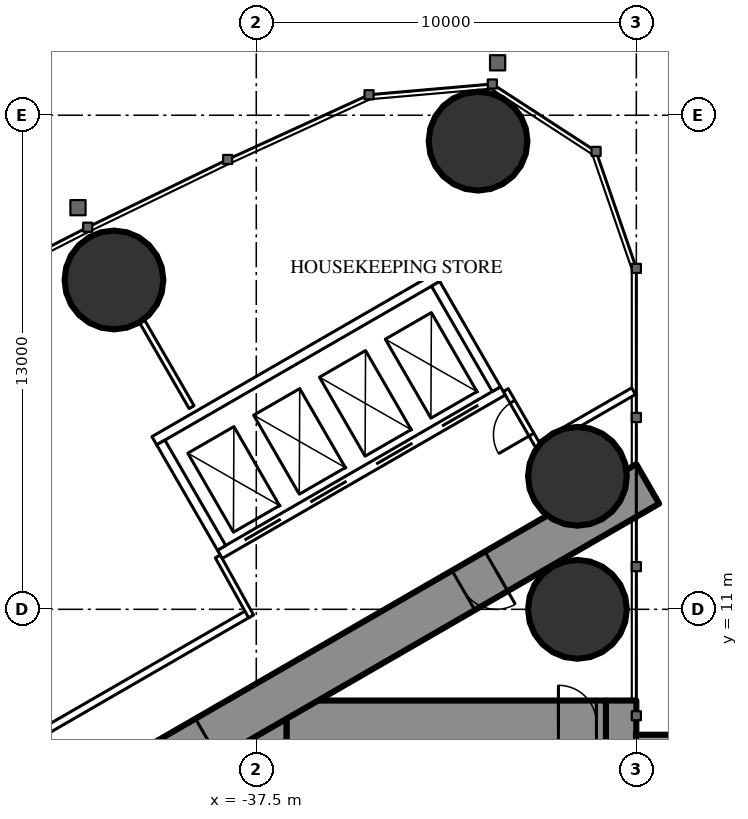
"""IFC4 building model, lengths in metres.
Left out: names, types, materials, properties, quantities, classifications, styles, units other than length and angle.
Written with IfcOpenShell. Run it as: python <this file> out.ifc"""

import sys

from ifc_helpers import new_model, si_unit, direction, frame, frame_2d, origin, origin_2d, place, context, subcontext, project, spatial, rectangle, hollow_circle, extrude, element, fill, save


model = new_model("IFC4")
c1 = context("Model", 3, precision=1e-05, world=origin(), true_north=direction((0.0, 1.0)))
c2 = subcontext(c1, "Body", "Model", "MODEL_VIEW")
j1 = project(units=[si_unit("LENGTHUNIT", "METRE"), si_unit("PLANEANGLEUNIT", "RADIAN")], contexts=[c1])
p1 = place(None, origin())
s1 = spatial("IfcSite", under=j1, at=p1, CompositionType="ELEMENT")
p2 = place(p1, origin())
s2 = spatial("IfcBuilding", under=s1, at=p2, CompositionType="ELEMENT")
p3 = place(p2, frame((0.0, 0.0, 115.1)))
s3 = spatial("IfcBuildingStorey", under=s2, at=p3, CompositionType="ELEMENT", Elevation=115.1)
for number, where, z_axis, x_axis in (
    (1, (-31.665, 23.318, 0.0), (0.0, 0.0, 1.0), (1.0, 0.0, 0.0)),
    (2, (-29.05, 11.0, 0.0), (0.0, 0.0, 1.0), (1.0, 0.0, 0.0)),
    (3, (-29.05, 14.5, 0.0), (0.0, 0.0, 1.0), (1.0, 0.0, 0.0)),
    (4, (-41.245, 19.666, 0.0), (0.0, 0.0, 1.0), (1.0, 0.0, 0.0)),
):
    element("IfcColumn", number, at=place(p3, frame(where, z_axis=z_axis, x_axis=x_axis)), inside=s3, PredefinedType="COLUMN", context=c2, shape_type="SweptSolid", body=[
        extrude(hollow_circle(Radius=1.3, WallThickness=0.1, at=origin_2d()), origin(), (0.0, 0.0, 1.0), 3.5),
    ])
p4 = place(p3, frame((-27.9, 8.6, 0.0), z_axis=(0.0, 0.0, 1.0), x_axis=(0.0, -1.0, 0.0)))
e5 = element("IfcWall", 5, at=p4, inside=s3, PredefinedType="SHEAR", context=c2, shape_type="SweptSolid", body=[
    extrude(rectangle(XDim=17.2, YDim=0.8, at=frame_2d((8.6, 0.0))), origin(), (0.0, 0.0, 1.0), 3.5),
])
p5 = place(p4, frame((2.45, 0.0, 0.6)))
e6 = element("IfcOpeningElement", 6, at=p5, cuts=e5, PredefinedType="OPENING", context=c2, shape_type="SweptSolid", body=[
    extrude(rectangle(XDim=0.6, YDim=2.1, at=frame_2d((0.3, 1.05))), frame((0.0, 0.41, 0.0), z_axis=(0.0, -1.0, 0.0), x_axis=(1.0, 0.0, 0.0)), (0.0, 0.0, 1.0), 0.82),
])
p6 = place(p4, frame((14.15, 0.0, 0.6)))
e7 = element("IfcOpeningElement", 7, at=p6, cuts=e5, PredefinedType="OPENING", context=c2, shape_type="SweptSolid", body=[
    extrude(rectangle(XDim=0.6, YDim=2.1, at=frame_2d((0.3, 1.05))), frame((0.0, 0.41, 0.0), z_axis=(0.0, -1.0, 0.0), x_axis=(1.0, 0.0, 0.0)), (0.0, 0.0, 1.0), 0.82),
])
p7 = place(p3, frame((-37.3, 8.6, 0.0), z_axis=(0.0, 0.0, 1.0), x_axis=(0.0, -1.0, 0.0)))
e8 = element("IfcWall", 8, at=p7, inside=s3, PredefinedType="SHEAR", context=c2, shape_type="SweptSolid", body=[
    extrude(rectangle(XDim=17.2, YDim=1.2, at=frame_2d((8.6, 0.0))), origin(), (0.0, 0.0, 1.0), 3.5),
])
p8 = place(p7, frame((7.7, 0.0, 0.0)))
e9 = element("IfcOpeningElement", 9, at=p8, cuts=e8, PredefinedType="OPENING", context=c2, shape_type="SweptSolid", body=[
    extrude(rectangle(XDim=1.8, YDim=2.2, at=frame_2d((0.9, 1.1))), frame((0.0, 0.61, 0.0), z_axis=(0.0, -1.0, 0.0), x_axis=(1.0, 0.0, 0.0)), (0.0, 0.0, 1.0), 1.22),
])
p9 = place(p3, frame((-28.3, 8.0, 0.0), z_axis=(0.0, 0.0, 1.0), x_axis=(-1.0, 0.0, 0.0)))
e10 = element("IfcWall", 10, at=p9, inside=s3, PredefinedType="SHEAR", context=c2, shape_type="SweptSolid", body=[
    extrude(rectangle(XDim=8.4, YDim=1.2, at=frame_2d((4.2, 0.0))), origin(), (0.0, 0.0, 1.0), 3.5),
])
p10 = place(p9, frame((0.25, 0.0, 0.0)))
e11 = element("IfcOpeningElement", 11, at=p10, cuts=e10, PredefinedType="OPENING", context=c2, shape_type="SweptSolid", body=[
    extrude(rectangle(XDim=1.0, YDim=2.2, at=frame_2d((0.5, 1.1))), frame((0.0, 0.61, 0.0), z_axis=(0.0, -1.0, 0.0), x_axis=(1.0, 0.0, 0.0)), (0.0, 0.0, 1.0), 1.22),
])
p11 = place(p3, frame((-27.2, 14.3, 0.0), z_axis=(0.0, 0.0, 1.0), x_axis=(-0.866026593062, -0.499997940104, 0.0)))
e12 = element("IfcWall", 12, at=p11, inside=s3, PredefinedType="SHEAR", context=c2, shape_type="SweptSolid", body=[
    extrude(rectangle(XDim=28.946, YDim=1.2, at=frame_2d((14.473, 0.0))), origin(), (0.0, 0.0, 1.0), 3.5),
])
p12 = place(p11, frame((4.6, 0.0, 0.0)))
e13 = element("IfcOpeningElement", 13, at=p12, cuts=e12, PredefinedType="OPENING", context=c2, shape_type="SweptSolid", body=[
    extrude(rectangle(XDim=1.0, YDim=2.2, at=frame_2d((0.5, 1.1))), frame((0.0, 0.61, 0.0), z_axis=(0.0, -1.0, 0.0), x_axis=(1.0, 0.0, 0.0)), (0.0, 0.0, 1.0), 1.22),
])
p13 = place(p11, frame((13.395, 0.0, 0.0)))
e14 = element("IfcOpeningElement", 14, at=p13, cuts=e12, PredefinedType="OPENING", context=c2, shape_type="SweptSolid", body=[
    extrude(rectangle(XDim=1.8, YDim=2.2, at=frame_2d((0.9, 1.1))), frame((0.0, 0.61, 0.0), z_axis=(0.0, -1.0, 0.0), x_axis=(1.0, 0.0, 0.0)), (0.0, 0.0, 1.0), 1.22),
])
p14 = place(p3, frame((-39.202, 16.32, 0.0), z_axis=(0.0, 0.0, 1.0), x_axis=(-0.499947391036, 0.866055775454, 0.0)))
e15 = element("IfcWall", 15, at=p14, inside=s3, PredefinedType="PARTITIONING", context=c2, shape_type="SweptSolid", body=[
    extrude(rectangle(XDim=2.599, YDim=0.15, at=frame_2d((1.3, 0.0))), origin(), (0.0, 0.0, 1.0), 3.25),
])
p15 = place(p3, frame((-27.572, 16.741, 0.0), z_axis=(0.0, 0.0, 1.0), x_axis=(-0.866034618596, -0.499984039138, 0.0)))
e16 = element("IfcWall", 16, at=p15, inside=s3, PredefinedType="PARTITIONING", context=c2, shape_type="SweptSolid", body=[
    extrude(rectangle(XDim=2.854, YDim=0.2, at=frame_2d((1.427, 0.0))), origin(), (0.0, 0.0, 1.0), 3.25),
])
p16 = place(p3, frame((-37.7, 10.894, 0.0), z_axis=(0.0, 0.0, 1.0), x_axis=(-0.866027905338, -0.499995667157, 0.0)))
e17 = element("IfcWall", 17, at=p16, inside=s3, PredefinedType="PARTITIONING", context=c2, shape_type="SweptSolid", body=[
    extrude(rectangle(XDim=21.787, YDim=0.2, at=frame_2d((10.894, 0.0))), origin(), (0.0, 0.0, 1.0), 3.25),
])
p17 = place(p16, frame((11.23, 0.0, 0.0)))
e18 = element("IfcOpeningElement", 18, at=p17, cuts=e17, PredefinedType="OPENING", context=c2, shape_type="SweptSolid", body=[
    extrude(rectangle(XDim=0.95, YDim=2.2, at=frame_2d((0.475, 1.1))), frame((0.0, 0.11, 0.0), z_axis=(0.0, -1.0, 0.0), x_axis=(1.0, 0.0, 0.0)), (0.0, 0.0, 1.0), 0.22),
])
p18 = place(p16, frame((9.531, 0.0, 0.0)))
e19 = element("IfcOpeningElement", 19, at=p18, cuts=e17, PredefinedType="OPENING", context=c2, shape_type="SweptSolid", body=[
    extrude(rectangle(XDim=0.95, YDim=2.2, at=frame_2d((0.475, 1.1))), frame((0.0, 0.11, 0.0), z_axis=(0.0, -1.0, 0.0), x_axis=(1.0, 0.0, 0.0)), (0.0, 0.0, 1.0), 0.22),
])
p19 = place(p3, frame((-38.513, 12.392, 0.0), z_axis=(0.0, 0.0, 1.0), x_axis=(0.485585508183, -0.874189175317, 0.0)))
e20 = element("IfcWall", 20, at=p19, inside=s3, PredefinedType="PARTITIONING", context=c2, shape_type="SweptSolid", body=[
    extrude(rectangle(XDim=1.805, YDim=0.15, at=frame_2d((0.902, 0.0))), origin(), (0.0, 0.0, 1.0), 3.25),
])
p20 = place(p3, frame((-30.033, 15.205, 0.0), z_axis=(0.0, 0.0, 1.0), x_axis=(-0.499980071345, 0.866036909293, 0.0)))
e21 = element("IfcWall", 21, at=p20, inside=s3, PredefinedType="PARTITIONING", context=c2, shape_type="SweptSolid", body=[
    extrude(rectangle(XDim=1.805, YDim=0.15, at=frame_2d((0.902, 0.0))), origin(), (0.0, 0.0, 1.0), 2.2),
])
p21 = place(p20, frame((0.452, 0.0, 0.0)))
e22 = element("IfcOpeningElement", 22, at=p21, cuts=e21, PredefinedType="OPENING", context=c2, shape_type="SweptSolid", body=[
    extrude(rectangle(XDim=1.0, YDim=2.2, at=frame_2d((0.5, 1.1))), frame((0.0, 0.085, 0.0), z_axis=(0.0, -1.0, 0.0), x_axis=(1.0, 0.0, 0.0)), (0.0, 0.0, 1.0), 0.17),
])
p22 = place(p3, frame((-31.01, 16.747, 0.0), z_axis=(0.0, 0.0, 1.0), x_axis=(-0.866028165386, -0.499995216735, 0.0)))
e23 = element("IfcWall", 23, at=p22, inside=s3, PredefinedType="PARTITIONING", context=c2, shape_type="SweptSolid", body=[
    extrude(rectangle(XDim=8.6, YDim=0.25, at=frame_2d((4.3, 0.0))), origin(), (0.0, 0.0, 1.0), 3.25),
])
p23 = place(p22, frame((0.75, 0.0, 0.0)))
e24 = element("IfcOpeningElement", 24, at=p23, cuts=e23, PredefinedType="OPENING", context=c2, shape_type="SweptSolid", body=[
    extrude(rectangle(XDim=1.1, YDim=2.2, at=frame_2d((0.55, 1.1))), frame((0.0, 0.135, 0.0), z_axis=(0.0, -1.0, 0.0), x_axis=(1.0, 0.0, 0.0)), (0.0, 0.0, 1.0), 0.27),
])
p24 = place(p22, frame((2.75, 0.0, 0.0)))
e25 = element("IfcOpeningElement", 25, at=p24, cuts=e23, PredefinedType="OPENING", context=c2, shape_type="SweptSolid", body=[
    extrude(rectangle(XDim=1.1, YDim=2.2, at=frame_2d((0.55, 1.1))), frame((0.0, 0.135, 0.0), z_axis=(0.0, -1.0, 0.0), x_axis=(1.0, 0.0, 0.0)), (0.0, 0.0, 1.0), 0.27),
])
p25 = place(p22, frame((4.75, 0.0, 0.0)))
e26 = element("IfcOpeningElement", 26, at=p25, cuts=e23, PredefinedType="OPENING", context=c2, shape_type="SweptSolid", body=[
    extrude(rectangle(XDim=1.1, YDim=2.2, at=frame_2d((0.55, 1.1))), frame((0.0, 0.135, 0.0), z_axis=(0.0, -1.0, 0.0), x_axis=(1.0, 0.0, 0.0)), (0.0, 0.0, 1.0), 0.27),
])
p26 = place(p22, frame((6.75, 0.0, 0.0)))
e27 = element("IfcOpeningElement", 27, at=p26, cuts=e23, PredefinedType="OPENING", context=c2, shape_type="SweptSolid", body=[
    extrude(rectangle(XDim=1.1, YDim=2.2, at=frame_2d((0.55, 1.1))), frame((0.0, 0.135, 0.0), z_axis=(0.0, -1.0, 0.0), x_axis=(1.0, 0.0, 0.0)), (0.0, 0.0, 1.0), 0.27),
])
p27 = place(p3, frame((-32.736, 19.736, 0.0), z_axis=(0.0, 0.0, 1.0), x_axis=(-0.866028165386, -0.499995216735, 0.0)))
e28 = element("IfcWall", 28, at=p27, inside=s3, PredefinedType="PARTITIONING", context=c2, shape_type="SweptSolid", body=[
    extrude(rectangle(XDim=8.6, YDim=0.25, at=frame_2d((4.3, 0.0))), origin(), (0.0, 0.0, 1.0), 3.25),
])
p28 = place(p3, frame((-31.181, 16.793, 0.0), z_axis=(0.0, 0.0, 1.0), x_axis=(-0.499929347863, 0.866066190972, 0.0)))
e29 = element("IfcWall", 29, at=p28, inside=s3, PredefinedType="PARTITIONING", context=c2, shape_type="SweptSolid", body=[
    extrude(rectangle(XDim=3.201, YDim=0.25, at=frame_2d((1.6, 0.0))), origin(), (0.0, 0.0, 1.0), 3.25),
])
p29 = place(p3, frame((-38.413, 12.618, 0.0), z_axis=(0.0, 0.0, 1.0), x_axis=(-0.499872130319, 0.866099216793, 0.0)))
e30 = element("IfcWall", 30, at=p29, inside=s3, PredefinedType="PARTITIONING", context=c2, shape_type="SweptSolid", body=[
    extrude(rectangle(XDim=3.2, YDim=0.25, at=frame_2d((1.6, 0.0))), origin(), (0.0, 0.0, 1.0), 3.25),
])
p30 = place(p21, origin())
e31 = element("IfcDoor", 31, at=p30, inside=s3, OperationType="SINGLE_SWING_LEFT", PredefinedType="DOOR", context=c2, shape_type="SweptSolid", body=[
    extrude(rectangle(XDim=1.0, YDim=2.2, at=frame_2d((0.5, 1.1))), frame((0.0, 0.025, 0.0), z_axis=(0.0, -1.0, 0.0), x_axis=(1.0, 0.0, 0.0)), (0.0, 0.0, 1.0), 0.05),
])
fill(e22, e31)
p31 = place(p12, origin())
e32 = element("IfcDoor", 32, at=p31, inside=s3, OperationType="SINGLE_SWING_LEFT", PredefinedType="DOOR", context=c2, shape_type="SweptSolid", body=[
    extrude(rectangle(XDim=1.0, YDim=2.2, at=frame_2d((0.5, 1.1))), frame((0.0, 0.025, 0.0), z_axis=(0.0, -1.0, 0.0), x_axis=(1.0, 0.0, 0.0)), (0.0, 0.0, 1.0), 0.05),
])
fill(e13, e32)
p32 = place(p13, origin())
e33 = element("IfcDoor", 33, at=p32, inside=s3, OperationType="DOUBLE_DOOR_SINGLE_SWING", PredefinedType="DOOR", context=c2, shape_type="SweptSolid", body=[
    extrude(rectangle(XDim=1.8, YDim=2.2, at=frame_2d((0.9, 1.1))), frame((0.0, 0.025, 0.0), z_axis=(0.0, -1.0, 0.0), x_axis=(1.0, 0.0, 0.0)), (0.0, 0.0, 1.0), 0.05),
])
fill(e14, e33)
p33 = place(p10, origin())
e34 = element("IfcDoor", 34, at=p33, inside=s3, OperationType="SINGLE_SWING_RIGHT", PredefinedType="DOOR", context=c2, shape_type="SweptSolid", body=[
    extrude(rectangle(XDim=1.0, YDim=2.2, at=frame_2d((0.5, 1.1))), frame((0.0, 0.025, 0.0), z_axis=(0.0, -1.0, 0.0), x_axis=(1.0, 0.0, 0.0)), (0.0, 0.0, 1.0), 0.05),
])
fill(e11, e34)
p34 = place(p23, origin())
e35 = element("IfcDoor", 35, at=p34, inside=s3, OperationType="DOUBLE_DOOR_SLIDING", PredefinedType="USERDEFINED", context=c2, shape_type="SweptSolid", body=[
    extrude(rectangle(XDim=1.1, YDim=2.2, at=frame_2d((0.55, 1.1))), frame((0.0, 0.025, 0.0), z_axis=(0.0, -1.0, 0.0), x_axis=(1.0, 0.0, 0.0)), (0.0, 0.0, 1.0), 0.05),
])
fill(e24, e35)
p35 = place(p24, origin())
e36 = element("IfcDoor", 36, at=p35, inside=s3, OperationType="DOUBLE_DOOR_SLIDING", PredefinedType="USERDEFINED", context=c2, shape_type="SweptSolid", body=[
    extrude(rectangle(XDim=1.1, YDim=2.2, at=frame_2d((0.55, 1.1))), frame((0.0, 0.025, 0.0), z_axis=(0.0, -1.0, 0.0), x_axis=(1.0, 0.0, 0.0)), (0.0, 0.0, 1.0), 0.05),
])
fill(e25, e36)
p36 = place(p25, origin())
e37 = element("IfcDoor", 37, at=p36, inside=s3, OperationType="DOUBLE_DOOR_SLIDING", PredefinedType="USERDEFINED", context=c2, shape_type="SweptSolid", body=[
    extrude(rectangle(XDim=1.1, YDim=2.2, at=frame_2d((0.55, 1.1))), frame((0.0, 0.025, 0.0), z_axis=(0.0, -1.0, 0.0), x_axis=(1.0, 0.0, 0.0)), (0.0, 0.0, 1.0), 0.05),
])
fill(e26, e37)
p37 = place(p26, origin())
e38 = element("IfcDoor", 38, at=p37, inside=s3, OperationType="DOUBLE_DOOR_SLIDING", PredefinedType="USERDEFINED", context=c2, shape_type="SweptSolid", body=[
    extrude(rectangle(XDim=1.1, YDim=2.2, at=frame_2d((0.55, 1.1))), frame((0.0, 0.025, 0.0), z_axis=(0.0, -1.0, 0.0), x_axis=(1.0, 0.0, 0.0)), (0.0, 0.0, 1.0), 0.05),
])
fill(e27, e38)
save(model, sys.argv[1])
